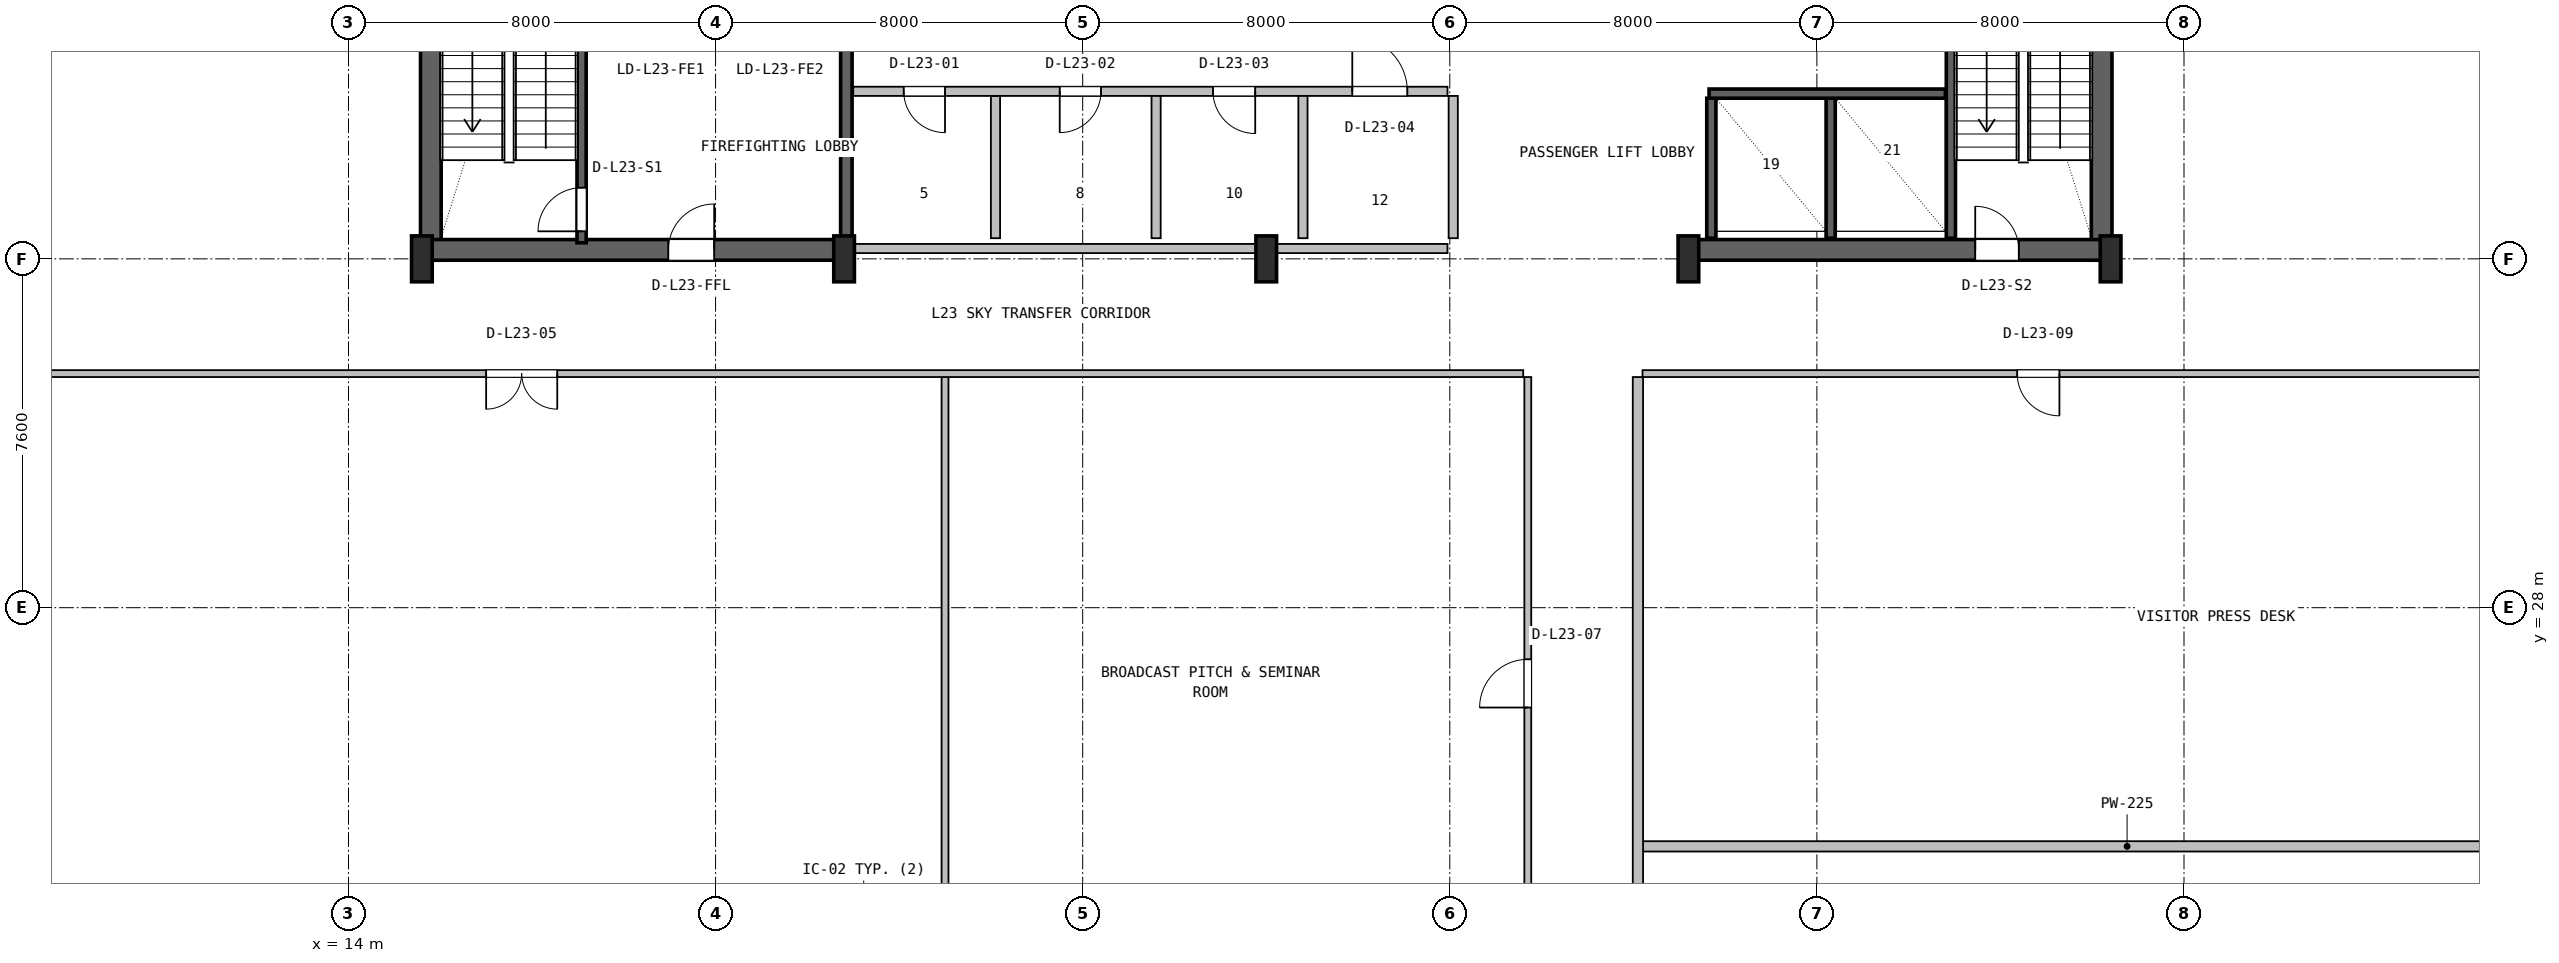
"""IFC4 building model, lengths in metres.
Left out: names, types, materials, properties, quantities, classifications, styles, units other than length and angle.
Written with IfcOpenShell. Run it as: python <this file> out.ifc"""

import sys

from ifc_helpers import new_model, si_unit, direction, frame, frame_2d, origin, origin_2d, place, context, subcontext, project, spatial, rectangle, i_section, extrude, source, transform, mapped, element, fill, save


model = new_model("IFC4")
c1 = context("Model", 3, precision=1e-05, world=origin(), true_north=direction((0.0, 1.0)))
c2 = subcontext(c1, "Body", "Model", "MODEL_VIEW")
j1 = project(units=[si_unit("LENGTHUNIT", "METRE"), si_unit("PLANEANGLEUNIT", "RADIAN")], contexts=[c1])
p1 = place(None, origin())
s1 = spatial("IfcSite", under=j1, at=p1, CompositionType="ELEMENT")
p2 = place(p1, origin())
s2 = spatial("IfcBuilding", under=s1, at=p2, CompositionType="ELEMENT")
p3 = place(p2, frame((0.0, 0.0, 98.4)))
s3 = spatial("IfcBuildingStorey", under=s2, at=p3, CompositionType="ELEMENT", Elevation=98.4)
for number, where, z_axis, x_axis in (
    (1, (15.795, 35.57, 0.0), (0.0, 0.0, 1.0), (0.0, 1.0, 0.0)),
    (2, (52.205, 35.57, 0.0), (0.0, 0.0, 1.0), (0.0, 1.0, 0.0)),
):
    element("IfcWall", number, at=place(p3, frame(where, z_axis=z_axis, x_axis=x_axis)), inside=s3, PredefinedType="SHEAR", context=c2, shape_type="SweptSolid", body=[
        extrude(rectangle(XDim=11.23, YDim=0.45, at=frame_2d((5.615, 0.0))), origin(), (0.0, 0.0, 1.0), 4.35),
    ])
p4 = place(p3, frame((15.57, 35.795, 0.0), z_axis=(0.0, 0.0, 1.0), x_axis=(1.0, 0.0, 0.0)))
e3 = element("IfcWall", 3, at=p4, inside=s3, PredefinedType="SHEAR", context=c2, shape_type="SweptSolid", body=[
    extrude(rectangle(XDim=9.23, YDim=0.45, at=frame_2d((4.615, 0.0))), origin(), (0.0, 0.0, 1.0), 4.35),
])
p5 = place(p4, frame((5.4, 0.0, 0.0)))
e4 = element("IfcOpeningElement", 4, at=p5, cuts=e3, PredefinedType="OPENING", context=c2, shape_type="SweptSolid", body=[
    extrude(rectangle(XDim=1.0, YDim=2.1, at=frame_2d((0.5, 1.05))), frame((0.0, 0.235, 0.0), z_axis=(0.0, -1.0, 0.0), x_axis=(1.0, 0.0, 0.0)), (0.0, 0.0, 1.0), 0.47),
])
p6 = place(p3, frame((43.2, 35.795, 0.0), z_axis=(0.0, 0.0, 1.0), x_axis=(1.0, 0.0, 0.0)))
e5 = element("IfcWall", 5, at=p6, inside=s3, PredefinedType="SHEAR", context=c2, shape_type="SweptSolid", body=[
    extrude(rectangle(XDim=9.23, YDim=0.45, at=frame_2d((4.615, 0.0))), origin(), (0.0, 0.0, 1.0), 4.35),
])
p7 = place(p6, frame((6.25, 0.0, 0.0)))
e6 = element("IfcOpeningElement", 6, at=p7, cuts=e5, PredefinedType="OPENING", context=c2, shape_type="SweptSolid", body=[
    extrude(rectangle(XDim=0.95, YDim=2.1, at=frame_2d((0.475, 1.05))), frame((0.0, 0.235, 0.0), z_axis=(0.0, -1.0, 0.0), x_axis=(1.0, 0.0, 0.0)), (0.0, 0.0, 1.0), 0.47),
])
m1 = source(origin(), c2, "Body", "SweptSolid", [
    extrude(i_section(OverallWidth=0.45, OverallDepth=1.0, WebThickness=0.016, FlangeThickness=0.03, FilletRadius=0.016, at=origin_2d()), origin(), (0.0, 0.0, 1.0), 4.6),
])
for number, where, z_axis, x_axis in (
    (7, (15.6, 35.6, 0.0), (0.0, 0.0, 1.0), (1.0, 0.0, 0.0)),
    (8, (24.8, 35.6, 0.0), (0.0, 0.0, 1.0), (1.0, 0.0, 0.0)),
    (9, (34.0, 35.6, 0.0), (0.0, 0.0, 1.0), (1.0, 0.0, 0.0)),
    (10, (43.2, 35.6, 0.0), (0.0, 0.0, 1.0), (1.0, 0.0, 0.0)),
    (11, (52.4, 35.6, 0.0), (0.0, 0.0, 1.0), (1.0, 0.0, 0.0)),
):
    element("IfcColumn", number, at=place(p3, frame(where, z_axis=z_axis, x_axis=x_axis)), inside=s3, PredefinedType="COLUMN", context=c2, shape_type="MappedRepresentation", body=[
        mapped(m1, transform((0.0, 0.0, 0.0), x_axis=(1.0, 0.0, 0.0), y_axis=(0.0, 1.0, 0.0), z_axis=(0.0, 0.0, 1.0), scale=1.0)),
    ])
p8 = place(p3, frame((19.08, 35.95, 0.0), z_axis=(0.0, 0.0, 1.0), x_axis=(0.0, 1.0, 0.0)))
e12 = element("IfcWall", 12, at=p8, inside=s3, PredefinedType="SHEAR", context=c2, shape_type="SweptSolid", body=[
    extrude(rectangle(XDim=9.65, YDim=0.2, at=frame_2d((4.825, 0.0))), origin(), (0.0, 0.0, 1.0), 4.35),
])
p9 = place(p8, frame((0.25, 0.0, 0.0)))
e13 = element("IfcOpeningElement", 13, at=p9, cuts=e12, PredefinedType="OPENING", context=c2, shape_type="SweptSolid", body=[
    extrude(rectangle(XDim=0.95, YDim=2.1, at=frame_2d((0.475, 1.05))), frame((0.0, 0.11, 0.0), z_axis=(0.0, -1.0, 0.0), x_axis=(1.0, 0.0, 0.0)), (0.0, 0.0, 1.0), 0.22),
])
p10 = place(p3, frame((24.85, 36.05, 0.0), z_axis=(0.0, 0.0, 1.0), x_axis=(0.0, 1.0, 0.0)))
e14 = element("IfcWall", 14, at=p10, inside=s3, PredefinedType="SHEAR", context=c2, shape_type="SweptSolid", body=[
    extrude(rectangle(XDim=10.45, YDim=0.25, at=frame_2d((5.225, 0.0))), origin(), (0.0, 0.0, 1.0), 4.35),
])
p11 = place(p3, frame((48.92, 36.05, 0.0), z_axis=(0.0, 0.0, 1.0), x_axis=(0.0, 1.0, 0.0)))
e15 = element("IfcWall", 15, at=p11, inside=s3, PredefinedType="SHEAR", context=c2, shape_type="SweptSolid", body=[
    extrude(rectangle(XDim=10.5, YDim=0.2, at=frame_2d((5.25, 0.0))), origin(), (0.0, 0.0, 1.0), 4.35),
])
for number, where, z_axis, x_axis in (
    (16, (43.7, 36.05, 0.0), (0.0, 0.0, 1.0), (0.0, 1.0, 0.0)),
    (17, (46.3, 36.05, 0.0), (0.0, 0.0, 1.0), (0.0, 1.0, 0.0)),
):
    element("IfcWall", number, at=place(p3, frame(where, z_axis=z_axis, x_axis=x_axis)), inside=s3, PredefinedType="SHEAR", context=c2, shape_type="SweptSolid", body=[
        extrude(rectangle(XDim=3.05, YDim=0.2, at=frame_2d((1.525, 0.0))), origin(), (0.0, 0.0, 1.0), 4.35),
    ])
p12 = place(p3, frame((43.65, 39.2, 0.0), z_axis=(0.0, 0.0, 1.0), x_axis=(1.0, 0.0, 0.0)))
e18 = element("IfcWall", 18, at=p12, inside=s3, PredefinedType="SHEAR", context=c2, shape_type="SweptSolid", body=[
    extrude(rectangle(XDim=5.15, YDim=0.2, at=frame_2d((2.575, 0.0))), origin(), (0.0, 0.0, 1.0), 4.35),
])
p13 = place(p3, frame((25.0, 35.825, 0.0), z_axis=(0.0, 0.0, 1.0), x_axis=(1.0, 0.0, 0.0)))
e19 = element("IfcWall", 19, at=p13, inside=s3, PredefinedType="SOLIDWALL", context=c2, shape_type="SweptSolid", body=[
    extrude(rectangle(XDim=12.95, YDim=0.2, at=frame_2d((6.475, 0.0))), origin(), (0.0, 0.0, 1.0), 3.125),
])
p14 = place(p3, frame((28.1, 36.05, 0.0), z_axis=(0.0, 0.0, 1.0), x_axis=(0.0, 1.0, 0.0)))
e20 = element("IfcWall", 20, at=p14, inside=s3, PredefinedType="PLUMBINGWALL", context=c2, shape_type="SweptSolid", body=[
    extrude(rectangle(XDim=3.1, YDim=0.2, at=frame_2d((1.55, 0.0))), origin(), (0.0, 0.0, 1.0), 4.33),
])
p15 = place(p3, frame((25.0, 39.25, 0.0), z_axis=(0.0, 0.0, 1.0), x_axis=(1.0, 0.0, 0.0)))
e21 = element("IfcWall", 21, at=p15, inside=s3, PredefinedType="SOLIDWALL", context=c2, shape_type="SweptSolid", body=[
    extrude(rectangle(XDim=12.95, YDim=0.2, at=frame_2d((6.475, 0.0))), origin(), (0.0, 0.0, 1.0), 4.33),
])
p16 = place(p15, frame((1.1, 0.0, 0.0)))
e22 = element("IfcOpeningElement", 22, at=p16, cuts=e21, PredefinedType="OPENING", context=c2, shape_type="SweptSolid", body=[
    extrude(rectangle(XDim=0.9, YDim=2.06, at=frame_2d((0.45, 1.03))), frame((0.0, 0.11, 0.0), z_axis=(0.0, -1.0, 0.0), x_axis=(1.0, 0.0, 0.0)), (0.0, 0.0, 1.0), 0.22),
])
p17 = place(p15, frame((4.5, 0.0, 0.0)))
e23 = element("IfcOpeningElement", 23, at=p17, cuts=e21, PredefinedType="OPENING", context=c2, shape_type="SweptSolid", body=[
    extrude(rectangle(XDim=0.9, YDim=2.06, at=frame_2d((0.45, 1.03))), frame((0.0, 0.11, 0.0), z_axis=(0.0, -1.0, 0.0), x_axis=(1.0, 0.0, 0.0)), (0.0, 0.0, 1.0), 0.22),
])
p18 = place(p15, frame((7.84, 0.0, 0.0)))
e24 = element("IfcOpeningElement", 24, at=p18, cuts=e21, PredefinedType="OPENING", context=c2, shape_type="SweptSolid", body=[
    extrude(rectangle(XDim=0.92, YDim=2.08, at=frame_2d((0.46, 1.04))), frame((0.0, 0.11, 0.0), z_axis=(0.0, -1.0, 0.0), x_axis=(1.0, 0.0, 0.0)), (0.0, 0.0, 1.0), 0.22),
])
p19 = place(p15, frame((10.875, 0.0, 0.0)))
e25 = element("IfcOpeningElement", 25, at=p19, cuts=e21, PredefinedType="OPENING", context=c2, shape_type="SweptSolid", body=[
    extrude(rectangle(XDim=1.2, YDim=2.1, at=frame_2d((0.6, 1.05))), frame((0.0, 0.11, 0.0), z_axis=(0.0, -1.0, 0.0), x_axis=(1.0, 0.0, 0.0)), (0.0, 0.0, 1.0), 0.22),
])
p20 = place(p3, frame((31.6, 36.05, 0.0), z_axis=(0.0, 0.0, 1.0), x_axis=(0.0, 1.0, 0.0)))
e26 = element("IfcWall", 26, at=p20, inside=s3, PredefinedType="PLUMBINGWALL", context=c2, shape_type="SweptSolid", body=[
    extrude(rectangle(XDim=3.1, YDim=0.2, at=frame_2d((1.55, 0.0))), origin(), (0.0, 0.0, 1.0), 4.33),
])
for number, where, z_axis, x_axis in (
    (27, (34.8, 36.05, 0.0), (0.0, 0.0, 1.0), (0.0, 1.0, 0.0)),
    (28, (38.075, 36.05, 0.0), (0.0, 0.0, 1.0), (0.0, 1.0, 0.0)),
):
    element("IfcWall", number, at=place(p3, frame(where, z_axis=z_axis, x_axis=x_axis)), inside=s3, PredefinedType="SOLIDWALL", context=c2, shape_type="SweptSolid", body=[
        extrude(rectangle(XDim=3.1, YDim=0.2, at=frame_2d((1.55, 0.0))), origin(), (0.0, 0.0, 1.0), 4.33),
    ])
p21 = place(p3, frame((27.0, 4.38, 0.0), z_axis=(0.0, 0.0, 1.0), x_axis=(0.0, 1.0, 0.0)))
e29 = element("IfcWall", 29, at=p21, inside=s3, PredefinedType="PARTITIONING", context=c2, shape_type="SweptSolid", body=[
    extrude(rectangle(XDim=28.645, YDim=0.15, at=frame_2d((14.323, 0.0))), origin(), (0.0, 0.0, 1.0), 3.63),
])
p22 = place(p3, frame((4.68, 33.1, 0.0), z_axis=(0.0, 0.0, 1.0), x_axis=(1.0, 0.0, 0.0)))
e30 = element("IfcWall", 30, at=p22, inside=s3, PredefinedType="PARTITIONING", context=c2, shape_type="SweptSolid", body=[
    extrude(rectangle(XDim=34.92, YDim=0.15, at=frame_2d((17.46, 0.0))), origin(), (0.0, 0.0, 1.0), 3.63),
])
p23 = place(p22, frame((12.32, 0.0, 0.0)))
e31 = element("IfcOpeningElement", 31, at=p23, cuts=e30, PredefinedType="OPENING", context=c2, shape_type="SweptSolid", body=[
    extrude(rectangle(XDim=1.55, YDim=2.12, at=frame_2d((0.775, 1.06))), frame((0.0, 0.085, 0.0), z_axis=(0.0, -1.0, 0.0), x_axis=(1.0, 0.0, 0.0)), (0.0, 0.0, 1.0), 0.17),
])
p24 = place(p3, frame((39.7, 4.38, 0.0), z_axis=(0.0, 0.0, 1.0), x_axis=(0.0, 1.0, 0.0)))
e32 = element("IfcWall", 32, at=p24, inside=s3, PredefinedType="PARTITIONING", context=c2, shape_type="SweptSolid", body=[
    extrude(rectangle(XDim=28.645, YDim=0.15, at=frame_2d((14.323, 0.0))), origin(), (0.0, 0.0, 1.0), 3.63),
])
p25 = place(p24, frame((7.625, 0.0, 0.0)))
e33 = element("IfcOpeningElement", 33, at=p25, cuts=e32, PredefinedType="OPENING", context=c2, shape_type="SweptSolid", body=[
    extrude(rectangle(XDim=0.88, YDim=2.06, at=frame_2d((0.44, 1.03))), frame((0.0, 0.085, 0.0), z_axis=(0.0, -1.0, 0.0), x_axis=(1.0, 0.0, 0.0)), (0.0, 0.0, 1.0), 0.17),
])
p26 = place(p24, frame((21.445, 0.0, 0.0)))
e34 = element("IfcOpeningElement", 34, at=p26, cuts=e32, PredefinedType="OPENING", context=c2, shape_type="SweptSolid", body=[
    extrude(rectangle(XDim=1.05, YDim=2.1, at=frame_2d((0.525, 1.05))), frame((0.0, 0.085, 0.0), z_axis=(0.0, -1.0, 0.0), x_axis=(1.0, 0.0, 0.0)), (0.0, 0.0, 1.0), 0.17),
])
p27 = place(p3, frame((42.2, 22.8, 0.0), z_axis=(0.0, 0.0, 1.0), x_axis=(1.0, 0.0, 0.0)))
e35 = element("IfcWall", 35, at=p27, inside=s3, PredefinedType="PARTITIONING", context=c2, shape_type="SweptSolid", body=[
    extrude(rectangle(XDim=21.12, YDim=0.225, at=frame_2d((10.56, 0.0))), origin(), (0.0, 0.0, 1.0), 3.63),
])
p28 = place(p3, frame((42.1, 4.38, 0.0), z_axis=(0.0, 0.0, 1.0), x_axis=(0.0, 1.0, 0.0)))
e36 = element("IfcWall", 36, at=p28, inside=s3, PredefinedType="PARTITIONING", context=c2, shape_type="SweptSolid", body=[
    extrude(rectangle(XDim=28.645, YDim=0.225, at=frame_2d((14.323, 0.0))), origin(), (0.0, 0.0, 1.0), 3.63),
])
p29 = place(p28, frame((9.015, 0.0, 0.0)))
e37 = element("IfcOpeningElement", 37, at=p29, cuts=e36, PredefinedType="OPENING", context=c2, shape_type="SweptSolid", body=[
    extrude(rectangle(XDim=1.4, YDim=2.12, at=frame_2d((0.7, 1.06))), frame((0.0, 0.123, 0.0), z_axis=(0.0, -1.0, 0.0), x_axis=(1.0, 0.0, 0.0)), (0.0, 0.0, 1.0), 0.245),
])
p30 = place(p3, frame((42.2, 33.1, 0.0), z_axis=(0.0, 0.0, 1.0), x_axis=(1.0, 0.0, 0.0)))
e38 = element("IfcWall", 38, at=p30, inside=s3, PredefinedType="PARTITIONING", context=c2, shape_type="SweptSolid", body=[
    extrude(rectangle(XDim=21.12, YDim=0.15, at=frame_2d((10.56, 0.0))), origin(), (0.0, 0.0, 1.0), 3.63),
])
p31 = place(p30, frame((8.165, 0.0, 0.0)))
e39 = element("IfcOpeningElement", 39, at=p31, cuts=e38, PredefinedType="OPENING", context=c2, shape_type="SweptSolid", body=[
    extrude(rectangle(XDim=0.92, YDim=2.08, at=frame_2d((0.46, 1.04))), frame((0.0, 0.085, 0.0), z_axis=(0.0, -1.0, 0.0), x_axis=(1.0, 0.0, 0.0)), (0.0, 0.0, 1.0), 0.17),
])
m2 = source(origin(), c2, "Body", "SweptSolid", [
    extrude(rectangle(XDim=0.95, YDim=2.1, at=frame_2d((0.475, 1.05))), frame((0.0, 0.025, 0.0), z_axis=(0.0, -1.0, 0.0), x_axis=(1.0, 0.0, 0.0)), (0.0, 0.0, 1.0), 0.05),
])
p32 = place(p9, origin())
e40 = element("IfcDoor", 40, at=p32, inside=s3, OperationType="SINGLE_SWING_LEFT", PredefinedType="DOOR", context=c2, shape_type="MappedRepresentation", body=[
    mapped(m2, transform((0.0, 0.0, 0.0), x_axis=(1.0, 0.0, 0.0), y_axis=(0.0, 1.0, 0.0), z_axis=(0.0, 0.0, 1.0), scale=1.0)),
])
fill(e13, e40)
m3 = source(origin(), c2, "Body", "SweptSolid", [
    extrude(rectangle(XDim=1.0, YDim=2.1, at=frame_2d((0.5, 1.05))), frame((0.0, 0.025, 0.0), z_axis=(0.0, -1.0, 0.0), x_axis=(1.0, 0.0, 0.0)), (0.0, 0.0, 1.0), 0.05),
])
p33 = place(p5, origin())
e41 = element("IfcDoor", 41, at=p33, inside=s3, OperationType="SINGLE_SWING_RIGHT", PredefinedType="DOOR", context=c2, shape_type="MappedRepresentation", body=[
    mapped(m3, transform((0.0, 0.0, 0.0), x_axis=(1.0, 0.0, 0.0), y_axis=(0.0, 1.0, 0.0), z_axis=(0.0, 0.0, 1.0), scale=1.0)),
])
fill(e4, e41)
p34 = place(p7, origin())
e42 = element("IfcDoor", 42, at=p34, inside=s3, OperationType="SINGLE_SWING_LEFT", PredefinedType="DOOR", context=c2, shape_type="MappedRepresentation", body=[
    mapped(m2, transform((0.0, 0.0, 0.0), x_axis=(1.0, 0.0, 0.0), y_axis=(0.0, 1.0, 0.0), z_axis=(0.0, 0.0, 1.0), scale=1.0)),
])
fill(e6, e42)
m4 = source(origin(), c2, "Body", "SweptSolid", [
    extrude(rectangle(XDim=0.9, YDim=2.06, at=frame_2d((0.45, 1.03))), frame((0.0, 0.025, 0.0), z_axis=(0.0, -1.0, 0.0), x_axis=(1.0, 0.0, 0.0)), (0.0, 0.0, 1.0), 0.05),
])
p35 = place(p16, frame((0.9, 0.0, 0.0), z_axis=(0.0, 0.0, 1.0), x_axis=(-1.0, 0.0, 0.0)))
e43 = element("IfcDoor", 43, at=p35, inside=s3, OperationType="SINGLE_SWING_RIGHT", PredefinedType="DOOR", context=c2, shape_type="MappedRepresentation", body=[
    mapped(m4, transform((0.0, 0.0, 0.0), x_axis=(1.0, 0.0, 0.0), y_axis=(0.0, 1.0, 0.0), z_axis=(0.0, 0.0, 1.0), scale=1.0)),
])
fill(e22, e43)
p36 = place(p17, frame((0.9, 0.0, 0.0), z_axis=(0.0, 0.0, 1.0), x_axis=(-1.0, 0.0, 0.0)))
e44 = element("IfcDoor", 44, at=p36, inside=s3, OperationType="SINGLE_SWING_LEFT", PredefinedType="DOOR", context=c2, shape_type="MappedRepresentation", body=[
    mapped(m4, transform((0.0, 0.0, 0.0), x_axis=(1.0, 0.0, 0.0), y_axis=(0.0, 1.0, 0.0), z_axis=(0.0, 0.0, 1.0), scale=1.0)),
])
fill(e23, e44)
m5 = source(origin(), c2, "Body", "SweptSolid", [
    extrude(rectangle(XDim=0.92, YDim=2.08, at=frame_2d((0.46, 1.04))), frame((0.0, 0.025, 0.0), z_axis=(0.0, -1.0, 0.0), x_axis=(1.0, 0.0, 0.0)), (0.0, 0.0, 1.0), 0.05),
])
p37 = place(p18, frame((0.92, 0.0, 0.0), z_axis=(0.0, 0.0, 1.0), x_axis=(-1.0, 0.0, 0.0)))
e45 = element("IfcDoor", 45, at=p37, inside=s3, OperationType="SINGLE_SWING_RIGHT", PredefinedType="DOOR", context=c2, shape_type="MappedRepresentation", body=[
    mapped(m5, transform((0.0, 0.0, 0.0), x_axis=(1.0, 0.0, 0.0), y_axis=(0.0, 1.0, 0.0), z_axis=(0.0, 0.0, 1.0), scale=1.0)),
])
fill(e24, e45)
m6 = source(origin(), c2, "Body", "SweptSolid", [
    extrude(rectangle(XDim=1.2, YDim=2.1, at=frame_2d((0.6, 1.05))), frame((0.0, 0.025, 0.0), z_axis=(0.0, -1.0, 0.0), x_axis=(1.0, 0.0, 0.0)), (0.0, 0.0, 1.0), 0.05),
])
p38 = place(p19, origin())
e46 = element("IfcDoor", 46, at=p38, inside=s3, OperationType="SINGLE_SWING_LEFT", PredefinedType="DOOR", context=c2, shape_type="MappedRepresentation", body=[
    mapped(m6, transform((0.0, 0.0, 0.0), x_axis=(1.0, 0.0, 0.0), y_axis=(0.0, 1.0, 0.0), z_axis=(0.0, 0.0, 1.0), scale=1.0)),
])
fill(e25, e46)
m7 = source(origin(), c2, "Body", "SweptSolid", [
    extrude(rectangle(XDim=1.55, YDim=2.12, at=frame_2d((0.775, 1.06))), frame((0.0, 0.025, 0.0), z_axis=(0.0, -1.0, 0.0), x_axis=(1.0, 0.0, 0.0)), (0.0, 0.0, 1.0), 0.05),
])
p39 = place(p23, frame((1.55, 0.0, 0.0), z_axis=(0.0, 0.0, 1.0), x_axis=(-1.0, 0.0, 0.0)))
e47 = element("IfcDoor", 47, at=p39, inside=s3, OperationType="DOUBLE_DOOR_SINGLE_SWING", PredefinedType="DOOR", context=c2, shape_type="MappedRepresentation", body=[
    mapped(m7, transform((0.0, 0.0, 0.0), x_axis=(1.0, 0.0, 0.0), y_axis=(0.0, 1.0, 0.0), z_axis=(0.0, 0.0, 1.0), scale=1.0)),
])
fill(e31, e47)
m8 = source(origin(), c2, "Body", "SweptSolid", [
    extrude(rectangle(XDim=1.05, YDim=2.1, at=frame_2d((0.525, 1.05))), frame((0.0, 0.025, 0.0), z_axis=(0.0, -1.0, 0.0), x_axis=(1.0, 0.0, 0.0)), (0.0, 0.0, 1.0), 0.05),
])
p40 = place(p26, origin())
e48 = element("IfcDoor", 48, at=p40, inside=s3, OperationType="SINGLE_SWING_LEFT", PredefinedType="DOOR", context=c2, shape_type="MappedRepresentation", body=[
    mapped(m8, transform((0.0, 0.0, 0.0), x_axis=(1.0, 0.0, 0.0), y_axis=(0.0, 1.0, 0.0), z_axis=(0.0, 0.0, 1.0), scale=1.0)),
])
fill(e34, e48)
p41 = place(p31, frame((0.92, 0.0, 0.0), z_axis=(0.0, 0.0, 1.0), x_axis=(-1.0, 0.0, 0.0)))
e49 = element("IfcDoor", 49, at=p41, inside=s3, OperationType="SINGLE_SWING_RIGHT", PredefinedType="DOOR", context=c2, shape_type="MappedRepresentation", body=[
    mapped(m5, transform((0.0, 0.0, 0.0), x_axis=(1.0, 0.0, 0.0), y_axis=(0.0, 1.0, 0.0), z_axis=(0.0, 0.0, 1.0), scale=1.0)),
])
fill(e39, e49)
save(model, sys.argv[1])
